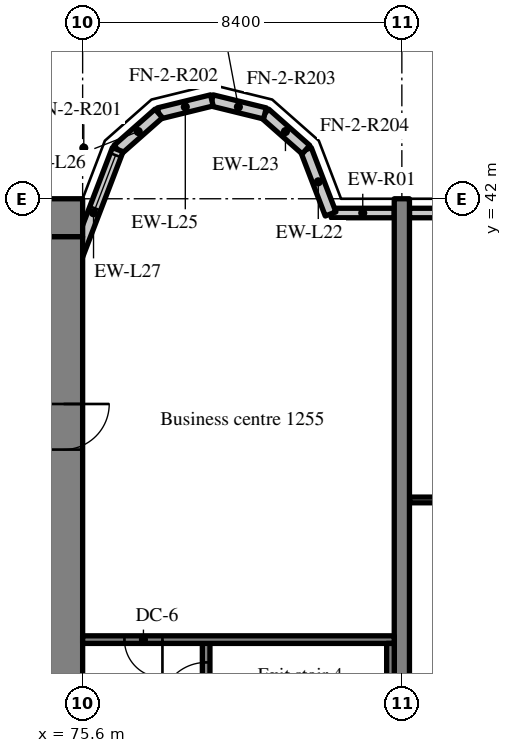
"""IFC4 building model, lengths in metres.
Left out: names, types, materials, properties, quantities, classifications, styles, units other than length and angle.
Written with IfcOpenShell. Run it as: python <this file> out.ifc"""

import sys

from ifc_helpers import new_model, si_unit, direction, frame, frame_2d, origin, place, context, subcontext, project, spatial, rectangle, extrude, source, transform, mapped, element, fill, save


model = new_model("IFC4")
c1 = context("Model", 3, precision=1e-05, world=origin(), true_north=direction((0.0, 1.0)))
c2 = subcontext(c1, "Body", "Model", "MODEL_VIEW")
j1 = project(units=[si_unit("LENGTHUNIT", "METRE"), si_unit("PLANEANGLEUNIT", "RADIAN")], contexts=[c1])
p1 = place(None, origin())
s1 = spatial("IfcSite", under=j1, at=p1, CompositionType="ELEMENT")
p2 = place(p1, origin())
s2 = spatial("IfcBuilding", under=s1, at=p2, CompositionType="ELEMENT")
p3 = place(p2, frame((0.0, 0.0, 54.4)))
s3 = spatial("IfcBuildingStorey", under=s2, at=p3, CompositionType="ELEMENT", Elevation=54.4)
m1 = source(origin(), c2, "Body", "SweptSolid", [
    extrude(rectangle(XDim=50.4, YDim=1.0, at=frame_2d((25.2, 0.0))), origin(), (0.0, 0.0, 1.0), 3.52),
])
p4 = place(p3, frame((25.2, 41.5, 0.0), z_axis=(0.0, 0.0, 1.0), x_axis=(1.0, 0.0, 0.0)))
e1 = element("IfcWall", 1, at=p4, inside=s3, PredefinedType="SHEAR", context=c2, shape_type="MappedRepresentation", body=[
    mapped(m1, transform((0.0, 0.0, 0.0), scale=1.0)),
])
m2 = source(origin(), c2, "Body", "SweptSolid", [
    extrude(rectangle(XDim=18.0, YDim=1.0, at=frame_2d((9.0, 0.0))), origin(), (0.0, 0.0, 1.0), 3.52),
])
p5 = place(p3, frame((75.1, 23.0, 0.0), z_axis=(0.0, 0.0, 1.0), x_axis=(0.0, 1.0, 0.0)))
e2 = element("IfcWall", 2, at=p5, inside=s3, PredefinedType="SHEAR", context=c2, shape_type="MappedRepresentation", body=[
    mapped(m2, transform((0.0, 0.0, 0.0), scale=1.0)),
])
m3 = source(origin(), c2, "Body", "SweptSolid", [
    extrude(rectangle(XDim=1.2, YDim=2.1, at=frame_2d((0.6, 1.05))), frame((0.0, 0.51, 0.0), z_axis=(0.0, -1.0, 0.0), x_axis=(1.0, 0.0, 0.0)), (0.0, 0.0, 1.0), 1.02),
])
p6 = place(p5, frame((12.4, 0.0, 0.0)))
e3 = element("IfcOpeningElement", 3, at=p6, cuts=e2, PredefinedType="OPENING", context=c2, shape_type="MappedRepresentation", body=[
    mapped(m3, transform((0.0, 0.0, 0.0), scale=1.0)),
])
m4 = source(origin(), c2, "Body", "SweptSolid", [
    extrude(rectangle(XDim=20.0, YDim=0.4, at=frame_2d((10.0, 0.0))), origin(), (0.0, 0.0, 1.0), 3.52),
])
p7 = place(p3, frame((84.0, 22.0, 0.0), z_axis=(0.0, 0.0, 1.0), x_axis=(0.0, 1.0, 0.0)))
e4 = element("IfcWall", 4, at=p7, inside=s3, PredefinedType="SHEAR", context=c2, shape_type="MappedRepresentation", body=[
    mapped(m4, transform((0.0, 0.0, 0.0), scale=1.0)),
])
m5 = source(origin(), c2, "Body", "SweptSolid", [
    extrude(rectangle(XDim=1.658, YDim=0.25, at=frame_2d((0.829, 0.0))), origin(), (0.0, 0.0, 1.0), 2.82),
])
p8 = place(p3, frame((83.8, 41.625, 0.0), z_axis=(0.0, 0.0, 1.0), x_axis=(-1.0, 0.0, 0.0)))
e5 = element("IfcWall", 5, at=p8, inside=s3, PredefinedType="SOLIDWALL", context=c2, shape_type="MappedRepresentation", body=[
    mapped(m5, transform((0.0, 0.0, 0.0), scale=1.0)),
])
m6 = source(origin(), c2, "Body", "SweptSolid", [
    extrude(rectangle(XDim=3.6, YDim=0.25, at=frame_2d((1.8, 0.0))), origin(), (0.0, 0.0, 1.0), 2.82),
])
p9 = place(p3, frame((87.8, 41.625, 0.0), z_axis=(0.0, 0.0, 1.0), x_axis=(-1.0, 0.0, 0.0)))
e6 = element("IfcWall", 6, at=p9, inside=s3, PredefinedType="SOLIDWALL", context=c2, shape_type="MappedRepresentation", body=[
    mapped(m6, transform((0.0, 0.0, 0.0), scale=1.0)),
])
m7 = source(origin(), c2, "Body", "SweptSolid", [
    extrude(rectangle(XDim=1.5, YDim=1.5, at=frame_2d((0.75, 0.75))), frame((0.0, 0.135, 0.0), z_axis=(0.0, -1.0, 0.0), x_axis=(1.0, 0.0, 0.0)), (0.0, 0.0, 1.0), 0.27),
])
p10 = place(p9, frame((1.05, 0.0, 0.9)))
e7 = element("IfcOpeningElement", 7, at=p10, cuts=e6, PredefinedType="OPENING", context=c2, shape_type="MappedRepresentation", body=[
    mapped(m7, transform((0.0, 0.0, 0.0), scale=1.0)),
])
m8 = source(origin(), c2, "Body", "SweptSolid", [
    extrude(rectangle(XDim=1.812, YDim=0.3, at=frame_2d((0.906, 0.0))), origin(), (0.0, 0.0, 1.0), 3.52),
])
p11 = place(p3, frame((82.125, 41.6, 0.0), z_axis=(0.0, 0.0, 1.0), x_axis=(-0.357877270961, 0.93376863244, 0.0)))
e8 = element("IfcWall", 8, at=p11, inside=s3, PredefinedType="SOLIDWALL", context=c2, shape_type="MappedRepresentation", body=[
    mapped(m8, transform((0.0, 0.0, 0.0), scale=1.0)),
])
m9 = source(origin(), c2, "Body", "SweptSolid", [
    extrude(rectangle(XDim=1.44, YDim=0.3, at=frame_2d((0.72, 0.0))), origin(), (0.0, 0.0, 1.0), 3.52),
])
p12 = place(p3, frame((81.477, 43.292, 0.0), z_axis=(0.0, 0.0, 1.0), x_axis=(-0.74957555648, 0.661918790432, 0.0)))
e9 = element("IfcWall", 9, at=p12, inside=s3, PredefinedType="SOLIDWALL", context=c2, shape_type="MappedRepresentation", body=[
    mapped(m9, transform((0.0, 0.0, 0.0), scale=1.0)),
])
m10 = source(origin(), c2, "Body", "SweptSolid", [
    extrude(rectangle(XDim=1.439, YDim=0.3, at=frame_2d((0.719, 0.0))), origin(), (0.0, 0.0, 1.0), 3.52),
])
for number, where, z_axis, x_axis in (
    (10, (80.397, 44.245, 0.0), (0.0, 0.0, 1.0), (-0.971, 0.238, 0.0)),
    (11, (79.0, 44.588, 0.0), (0.0, 0.0, 1.0), (-0.971, -0.238, 0.0)),
):
    element("IfcWall", number, at=place(p3, frame(where, z_axis=z_axis, x_axis=x_axis)), inside=s3, PredefinedType="SOLIDWALL", context=c2, shape_type="MappedRepresentation", body=[
        mapped(m10, transform((0.0, 0.0, 0.0), scale=1.0)),
    ])
p13 = place(p3, frame((77.603, 44.245, 0.0), z_axis=(0.0, 0.0, 1.0), x_axis=(-0.74957555648, -0.661918790432, 0.0)))
e12 = element("IfcWall", 12, at=p13, inside=s3, PredefinedType="SOLIDWALL", context=c2, shape_type="MappedRepresentation", body=[
    mapped(m9, transform((0.0, 0.0, 0.0), scale=1.0)),
])
m11 = source(origin(), c2, "Body", "SweptSolid", [
    extrude(rectangle(XDim=3.559, YDim=0.3, at=frame_2d((1.78, 0.0))), origin(), (0.0, 0.0, 1.0), 3.52),
])
p14 = place(p3, frame((76.523, 43.292, 0.0), z_axis=(0.0, 0.0, 1.0), x_axis=(-0.35779745313, -0.933799219604, 0.0)))
e13 = element("IfcWall", 13, at=p14, inside=s3, PredefinedType="SOLIDWALL", context=c2, shape_type="MappedRepresentation", body=[
    mapped(m11, transform((0.0, 0.0, 0.0), scale=1.0)),
])
m12 = source(origin(), c2, "Body", "SweptSolid", [
    extrude(rectangle(XDim=1.5, YDim=2.0, at=frame_2d((0.75, 1.0))), frame((0.0, 0.16, 0.0), z_axis=(0.0, -1.0, 0.0), x_axis=(1.0, 0.0, 0.0)), (0.0, 0.0, 1.0), 0.32),
])
p15 = place(p14, frame((0.156, 0.0, 0.9)))
e14 = element("IfcOpeningElement", 14, at=p15, cuts=e13, PredefinedType="OPENING", context=c2, shape_type="MappedRepresentation", body=[
    mapped(m12, transform((0.0, 0.0, 0.0), scale=1.0)),
])
m13 = source(origin(), c2, "Body", "SweptSolid", [
    extrude(rectangle(XDim=8.3, YDim=0.2, at=frame_2d((4.15, 0.0))), origin(), (0.0, 0.0, 1.0), 3.52),
])
p16 = place(p3, frame((78.85, 22.1, 0.0), z_axis=(0.0, 0.0, 1.0), x_axis=(0.0, 1.0, 0.0)))
e15 = element("IfcWall", 15, at=p16, inside=s3, PredefinedType="SOLIDWALL", context=c2, shape_type="MappedRepresentation", body=[
    mapped(m13, transform((0.0, 0.0, 0.0), scale=1.0)),
])
m14 = source(origin(), c2, "Body", "SweptSolid", [
    extrude(rectangle(XDim=1.2, YDim=2.1, at=frame_2d((0.6, 1.05))), frame((0.0, 0.11, 0.0), z_axis=(0.0, -1.0, 0.0), x_axis=(1.0, 0.0, 0.0)), (0.0, 0.0, 1.0), 0.22),
])
p17 = place(p16, frame((6.5, 0.0, 0.0)))
e16 = element("IfcOpeningElement", 16, at=p17, cuts=e15, PredefinedType="OPENING", context=c2, shape_type="MappedRepresentation", body=[
    mapped(m14, transform((0.0, 0.0, 0.0), scale=1.0)),
])
m15 = source(origin(), c2, "Body", "SweptSolid", [
    extrude(rectangle(XDim=8.2, YDim=0.2, at=frame_2d((4.1, 0.0))), origin(), (0.0, 0.0, 1.0), 3.52),
])
p18 = place(p3, frame((83.8, 30.4, 0.0), z_axis=(0.0, 0.0, 1.0), x_axis=(-1.0, 0.0, 0.0)))
e17 = element("IfcWall", 17, at=p18, inside=s3, PredefinedType="SOLIDWALL", context=c2, shape_type="MappedRepresentation", body=[
    mapped(m15, transform((0.0, 0.0, 0.0), scale=1.0)),
])
m16 = source(origin(), c2, "Body", "SweptSolid", [
    extrude(rectangle(XDim=1.0, YDim=2.1, at=frame_2d((0.5, 1.05))), frame((0.0, 0.11, 0.0), z_axis=(0.0, -1.0, 0.0), x_axis=(1.0, 0.0, 0.0)), (0.0, 0.0, 1.0), 0.22),
])
p19 = place(p18, frame((6.1, 0.0, 0.0)))
e18 = element("IfcOpeningElement", 18, at=p19, cuts=e17, PredefinedType="OPENING", context=c2, shape_type="MappedRepresentation", body=[
    mapped(m16, transform((0.0, 0.0, 0.0), scale=1.0)),
])
m17 = source(origin(), c2, "Body", "SweptSolid", [
    extrude(rectangle(XDim=8.1, YDim=0.2, at=frame_2d((4.05, 0.0))), origin(), (0.0, 0.0, 1.0), 3.52),
])
p20 = place(p3, frame((83.7, 22.2, 0.0), z_axis=(0.0, 0.0, 1.0), x_axis=(0.0, 1.0, 0.0)))
e19 = element("IfcWall", 19, at=p20, inside=s3, PredefinedType="SOLIDWALL", context=c2, shape_type="MappedRepresentation", body=[
    mapped(m17, transform((0.0, 0.0, 0.0), scale=1.0)),
])
m18 = source(origin(), c2, "Body", "SweptSolid", [
    extrude(rectangle(XDim=8.0, YDim=0.15, at=frame_2d((4.0, 0.0))), origin(), (0.0, 0.0, 1.0), 3.52),
])
p21 = place(p3, frame((84.2, 34.075, 0.0), z_axis=(0.0, 0.0, 1.0), x_axis=(1.0, 0.0, 0.0)))
e20 = element("IfcWall", 20, at=p21, inside=s3, PredefinedType="PARTITIONING", context=c2, shape_type="MappedRepresentation", body=[
    mapped(m18, transform((0.0, 0.0, 0.0), scale=1.0)),
])
m19 = source(origin(), c2, "Body", "SweptSolid", [
    extrude(rectangle(XDim=1.0, YDim=2.1, at=frame_2d((0.5, 1.05))), frame((0.0, 0.085, 0.0), z_axis=(0.0, -1.0, 0.0), x_axis=(1.0, 0.0, 0.0)), (0.0, 0.0, 1.0), 0.17),
])
p22 = place(p21, frame((0.7, 0.0, 0.0)))
e21 = element("IfcOpeningElement", 21, at=p22, cuts=e20, PredefinedType="OPENING", context=c2, shape_type="MappedRepresentation", body=[
    mapped(m19, transform((0.0, 0.0, 0.0), scale=1.0)),
])
m20 = source(origin(), c2, "Body", "SweptSolid", [
    extrude(rectangle(XDim=1.5, YDim=2.0, at=frame_2d((0.75, 1.0))), frame((0.0, 0.03, 0.0), z_axis=(0.0, -1.0, 0.0), x_axis=(1.0, 0.0, 0.0)), (0.0, 0.0, 1.0), 0.06),
])
p23 = place(p15, origin())
e22 = element("IfcWindow", 22, at=p23, inside=s3, PartitioningType="SINGLE_PANEL", PredefinedType="WINDOW", context=c2, shape_type="MappedRepresentation", body=[
    mapped(m20, transform((0.0, 0.0, 0.0), scale=1.0)),
])
fill(e14, e22)
m21 = source(origin(), c2, "Body", "SweptSolid", [
    extrude(rectangle(XDim=1.2, YDim=2.1, at=frame_2d((0.6, 1.05))), frame((0.0, 0.025, 0.0), z_axis=(0.0, -1.0, 0.0), x_axis=(1.0, 0.0, 0.0)), (0.0, 0.0, 1.0), 0.05),
])
p24 = place(p6, origin())
e23 = element("IfcDoor", 23, at=p24, inside=s3, OperationType="SINGLE_SWING_RIGHT", PredefinedType="DOOR", context=c2, shape_type="MappedRepresentation", body=[
    mapped(m21, transform((0.0, 0.0, 0.0), scale=1.0)),
])
fill(e3, e23)
p25 = place(p17, origin())
e24 = element("IfcDoor", 24, at=p25, inside=s3, OperationType="SINGLE_SWING_LEFT", PredefinedType="DOOR", context=c2, shape_type="MappedRepresentation", body=[
    mapped(m21, transform((0.0, 0.0, 0.0), scale=1.0)),
])
fill(e16, e24)
m22 = source(origin(), c2, "Body", "SweptSolid", [
    extrude(rectangle(XDim=1.0, YDim=2.1, at=frame_2d((0.5, 1.05))), frame((0.0, 0.025, 0.0), z_axis=(0.0, -1.0, 0.0), x_axis=(1.0, 0.0, 0.0)), (0.0, 0.0, 1.0), 0.05),
])
p26 = place(p19, origin())
e25 = element("IfcDoor", 25, at=p26, inside=s3, OperationType="SINGLE_SWING_LEFT", PredefinedType="DOOR", context=c2, shape_type="MappedRepresentation", body=[
    mapped(m22, transform((0.0, 0.0, 0.0), scale=1.0)),
])
fill(e18, e25)
save(model, sys.argv[1])
